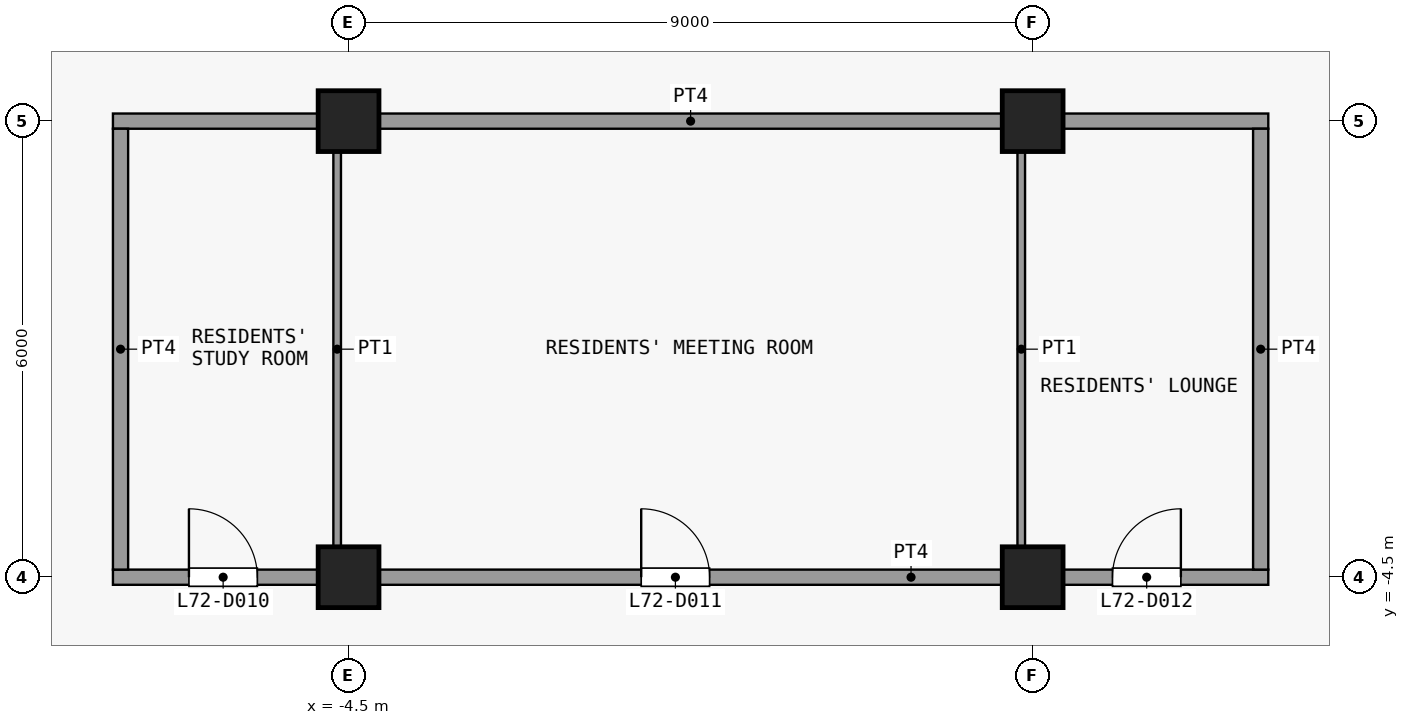
"""IFC4 building model, lengths in metres.
Left out: names, types, materials, properties, quantities, classifications, styles, units other than length and angle.
Written with IfcOpenShell. Run it as: python <this file> out.ifc"""

import sys

from ifc_helpers import new_model, si_unit, direction, frame, frame_2d, origin, origin_2d, place, context, subcontext, project, spatial, rectangle, extrude, element, fill, save


model = new_model("IFC4")
c1 = context("Model", 3, precision=1e-05, world=origin(), true_north=direction((0.0, 1.0)))
c2 = subcontext(c1, "Body", "Model", "MODEL_VIEW")
j1 = project(units=[si_unit("LENGTHUNIT", "METRE"), si_unit("PLANEANGLEUNIT", "RADIAN")], contexts=[c1])
p1 = place(None, origin())
s1 = spatial("IfcSite", under=j1, at=p1, CompositionType="ELEMENT")
p2 = place(p1, origin())
s2 = spatial("IfcBuilding", under=s1, at=p2, CompositionType="ELEMENT")
p3 = place(p2, frame((0.0, 0.0, 284.3)))
s3 = spatial("IfcBuildingStorey", under=s2, at=p3, CompositionType="ELEMENT", Elevation=284.3)
for number, where, z_axis, x_axis in (
    (1, (-4.5, -4.5, 0.0), (0.0, 0.0, 1.0), (1.0, 0.0, 0.0)),
    (2, (-4.5, 1.5, 0.0), (0.0, 0.0, 1.0), (1.0, 0.0, 0.0)),
    (3, (4.5, -4.5, 0.0), (0.0, 0.0, 1.0), (1.0, 0.0, 0.0)),
    (4, (4.5, 1.5, 0.0), (0.0, 0.0, 1.0), (1.0, 0.0, 0.0)),
):
    element("IfcColumn", number, at=place(p3, frame(where, z_axis=z_axis, x_axis=x_axis)), inside=s3, PredefinedType="COLUMN", context=c2, shape_type="SweptSolid", body=[
        extrude(rectangle(XDim=0.8, YDim=0.8, at=origin_2d()), origin(), (0.0, 0.0, 1.0), 3.6),
    ])
p4 = place(p3, frame((-7.6, -4.5, 0.0), z_axis=(0.0, 0.0, 1.0), x_axis=(1.0, 0.0, 0.0)))
e5 = element("IfcWall", 5, at=p4, inside=s3, PredefinedType="PARTITIONING", context=c2, shape_type="SweptSolid", body=[
    extrude(rectangle(XDim=15.2, YDim=0.2, at=frame_2d((7.6, 0.0))), origin(), (0.0, 0.0, 1.0), 3.3),
])
p5 = place(p4, frame((1.0, 0.0, 0.0)))
e6 = element("IfcOpeningElement", 6, at=p5, cuts=e5, PredefinedType="OPENING", context=c2, shape_type="SweptSolid", body=[
    extrude(rectangle(XDim=0.9, YDim=2.1, at=frame_2d((0.45, 1.05))), frame((0.0, 0.11, 0.0), z_axis=(0.0, -1.0, 0.0), x_axis=(1.0, 0.0, 0.0)), (0.0, 0.0, 1.0), 0.22),
])
p6 = place(p4, frame((6.95, 0.0, 0.0)))
e7 = element("IfcOpeningElement", 7, at=p6, cuts=e5, PredefinedType="OPENING", context=c2, shape_type="SweptSolid", body=[
    extrude(rectangle(XDim=0.9, YDim=2.1, at=frame_2d((0.45, 1.05))), frame((0.0, 0.11, 0.0), z_axis=(0.0, -1.0, 0.0), x_axis=(1.0, 0.0, 0.0)), (0.0, 0.0, 1.0), 0.22),
])
p7 = place(p4, frame((13.15, 0.0, 0.0)))
e8 = element("IfcOpeningElement", 8, at=p7, cuts=e5, PredefinedType="OPENING", context=c2, shape_type="SweptSolid", body=[
    extrude(rectangle(XDim=0.9, YDim=2.1, at=frame_2d((0.45, 1.05))), frame((0.0, 0.11, 0.0), z_axis=(0.0, -1.0, 0.0), x_axis=(1.0, 0.0, 0.0)), (0.0, 0.0, 1.0), 0.22),
])
p8 = place(p3, frame((-7.6, 1.5, 0.0), z_axis=(0.0, 0.0, 1.0), x_axis=(1.0, 0.0, 0.0)))
e9 = element("IfcWall", 9, at=p8, inside=s3, PredefinedType="PARTITIONING", context=c2, shape_type="SweptSolid", body=[
    extrude(rectangle(XDim=15.2, YDim=0.2, at=frame_2d((7.6, 0.0))), origin(), (0.0, 0.0, 1.0), 3.3),
])
p9 = place(p3, frame((-7.5, -4.4, 0.0), z_axis=(0.0, 0.0, 1.0), x_axis=(0.0, 1.0, 0.0)))
e10 = element("IfcWall", 10, at=p9, inside=s3, PredefinedType="PARTITIONING", context=c2, shape_type="SweptSolid", body=[
    extrude(rectangle(XDim=5.8, YDim=0.2, at=frame_2d((2.9, 0.0))), origin(), (0.0, 0.0, 1.0), 3.3),
])
for number, where, z_axis, x_axis in (
    (11, (-4.65, -4.4, 0.0), (0.0, 0.0, 1.0), (0.0, 1.0, 0.0)),
    (12, (4.35, -4.4, 0.0), (0.0, 0.0, 1.0), (0.0, 1.0, 0.0)),
):
    element("IfcWall", number, at=place(p3, frame(where, z_axis=z_axis, x_axis=x_axis)), inside=s3, PredefinedType="PARTITIONING", context=c2, shape_type="SweptSolid", body=[
        extrude(rectangle(XDim=5.8, YDim=0.1, at=frame_2d((2.9, 0.0))), origin(), (0.0, 0.0, 1.0), 3.3),
    ])
p10 = place(p3, frame((7.5, -4.4, 0.0), z_axis=(0.0, 0.0, 1.0), x_axis=(0.0, 1.0, 0.0)))
e13 = element("IfcWall", 13, at=p10, inside=s3, PredefinedType="PARTITIONING", context=c2, shape_type="SweptSolid", body=[
    extrude(rectangle(XDim=5.8, YDim=0.2, at=frame_2d((2.9, 0.0))), origin(), (0.0, 0.0, 1.0), 3.3),
])
p11 = place(p5, origin())
e14 = element("IfcDoor", 14, at=p11, inside=s3, OperationType="SINGLE_SWING_RIGHT", PredefinedType="DOOR", context=c2, shape_type="SweptSolid", body=[
    extrude(rectangle(XDim=0.9, YDim=2.1, at=frame_2d((0.45, 1.05))), frame((0.0, 0.025, 0.0), z_axis=(0.0, -1.0, 0.0), x_axis=(1.0, 0.0, 0.0)), (0.0, 0.0, 1.0), 0.05),
])
fill(e6, e14)
p12 = place(p6, origin())
e15 = element("IfcDoor", 15, at=p12, inside=s3, OperationType="SINGLE_SWING_RIGHT", PredefinedType="DOOR", context=c2, shape_type="SweptSolid", body=[
    extrude(rectangle(XDim=0.9, YDim=2.1, at=frame_2d((0.45, 1.05))), frame((0.0, 0.025, 0.0), z_axis=(0.0, -1.0, 0.0), x_axis=(1.0, 0.0, 0.0)), (0.0, 0.0, 1.0), 0.05),
])
fill(e7, e15)
p13 = place(p7, origin())
e16 = element("IfcDoor", 16, at=p13, inside=s3, OperationType="SINGLE_SWING_LEFT", PredefinedType="DOOR", context=c2, shape_type="SweptSolid", body=[
    extrude(rectangle(XDim=0.9, YDim=2.1, at=frame_2d((0.45, 1.05))), frame((0.0, 0.025, 0.0), z_axis=(0.0, -1.0, 0.0), x_axis=(1.0, 0.0, 0.0)), (0.0, 0.0, 1.0), 0.05),
])
fill(e8, e16)
save(model, sys.argv[1])
